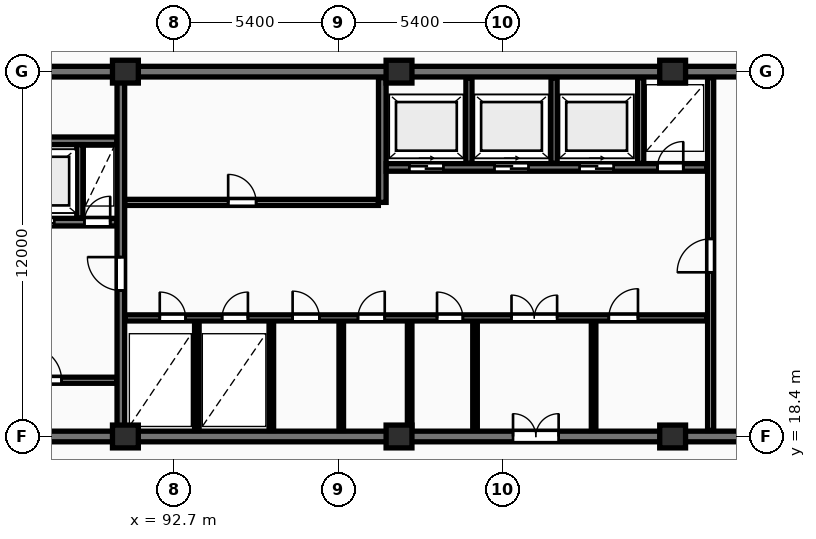
"""IFC4 building model, lengths in metres.
Left out: names, types, materials, properties, quantities, classifications, styles, units other than length and angle.
Written with IfcOpenShell. Run it as: python <this file> out.ifc"""

import sys

from ifc_helpers import new_model, si_unit, direction, frame, frame_2d, origin, origin_2d, place, context, subcontext, project, spatial, rectangle, extrude, element, fill, save


model = new_model("IFC4")
c1 = context("Model", 3, precision=1e-05, world=origin(), true_north=direction((0.0, 1.0)))
c2 = subcontext(c1, "Body", "Model", "MODEL_VIEW")
j1 = project(units=[si_unit("LENGTHUNIT", "METRE"), si_unit("PLANEANGLEUNIT", "RADIAN")], contexts=[c1])
p1 = place(None, origin())
s1 = spatial("IfcSite", under=j1, at=p1, CompositionType="ELEMENT")
p2 = place(p1, origin())
s2 = spatial("IfcBuilding", under=s1, at=p2, CompositionType="ELEMENT")
p3 = place(p2, frame((0.0, 0.0, 157.3)))
s3 = spatial("IfcBuildingStorey", under=s2, at=p3, CompositionType="ELEMENT", Elevation=157.3)
for number, where, z_axis, x_axis in (
    (1, (91.1, 18.4, 0.0), (0.0, 0.0, 1.0), (1.0, 0.0, 0.0)),
    (2, (91.1, 30.4, 0.0), (0.0, 0.0, 1.0), (1.0, 0.0, 0.0)),
    (3, (100.1, 18.4, 0.0), (0.0, 0.0, 1.0), (1.0, 0.0, 0.0)),
    (4, (100.1, 30.4, 0.0), (0.0, 0.0, 1.0), (1.0, 0.0, 0.0)),
    (5, (109.1, 18.4, 0.0), (0.0, 0.0, 1.0), (1.0, 0.0, 0.0)),
    (6, (109.1, 30.4, 0.0), (0.0, 0.0, 1.0), (1.0, 0.0, 0.0)),
):
    element("IfcColumn", number, at=place(p3, frame(where, z_axis=z_axis, x_axis=x_axis)), inside=s3, PredefinedType="COLUMN", context=c2, shape_type="SweptSolid", body=[
        extrude(rectangle(XDim=0.85, YDim=0.75, at=origin_2d()), origin(), (0.0, 0.0, 1.0), 4.8),
    ])
p4 = place(p3, frame((81.925, 30.4, 0.0), z_axis=(0.0, 0.0, 1.0), x_axis=(1.0, 0.0, 0.0)))
e7 = element("IfcWall", 7, at=p4, inside=s3, PredefinedType="SHEAR", context=c2, shape_type="SweptSolid", body=[
    extrude(rectangle(XDim=36.265, YDim=0.35, at=frame_2d((18.132, 0.0))), origin(), (0.0, 0.0, 1.0), 4.8),
])
p5 = place(p3, frame((81.925, 18.4, 0.0), z_axis=(0.0, 0.0, 1.0), x_axis=(1.0, 0.0, 0.0)))
e8 = element("IfcWall", 8, at=p5, inside=s3, PredefinedType="SHEAR", context=c2, shape_type="SweptSolid", body=[
    extrude(rectangle(XDim=36.265, YDim=0.35, at=frame_2d((18.132, 0.0))), origin(), (0.0, 0.0, 1.0), 4.8),
])
p6 = place(p5, frame((5.675, 0.0, 0.0)))
e9 = element("IfcOpeningElement", 9, at=p6, cuts=e8, PredefinedType="OPENING", context=c2, shape_type="SweptSolid", body=[
    extrude(rectangle(XDim=1.0, YDim=2.15, at=frame_2d((0.5, 1.075))), frame((0.0, 0.185, 0.0), z_axis=(0.0, -1.0, 0.0), x_axis=(1.0, 0.0, 0.0)), (0.0, 0.0, 1.0), 0.37),
])
p7 = place(p5, frame((21.925, 0.0, 0.0)))
e10 = element("IfcOpeningElement", 10, at=p7, cuts=e8, PredefinedType="OPENING", context=c2, shape_type="SweptSolid", body=[
    extrude(rectangle(XDim=1.5, YDim=2.2, at=frame_2d((0.75, 1.1))), frame((0.0, 0.185, 0.0), z_axis=(0.0, -1.0, 0.0), x_axis=(1.0, 0.0, 0.0)), (0.0, 0.0, 1.0), 0.37),
])
p8 = place(p5, frame((29.875, 0.0, 0.0)))
e11 = element("IfcOpeningElement", 11, at=p8, cuts=e8, PredefinedType="OPENING", context=c2, shape_type="SweptSolid", body=[
    extrude(rectangle(XDim=1.0, YDim=2.15, at=frame_2d((0.5, 1.075))), frame((0.0, 0.185, 0.0), z_axis=(0.0, -1.0, 0.0), x_axis=(1.0, 0.0, 0.0)), (0.0, 0.0, 1.0), 0.37),
])
p9 = place(p3, frame((83.0, 28.125, 0.0), z_axis=(0.0, 0.0, 1.0), x_axis=(1.0, 0.0, 0.0)))
e12 = element("IfcWall", 12, at=p9, inside=s3, PredefinedType="SHEAR", context=c2, shape_type="SweptSolid", body=[
    extrude(rectangle(XDim=7.82, YDim=0.25, at=frame_2d((3.91, 0.0))), origin(), (0.0, 0.0, 1.0), 4.8),
])
p10 = place(p3, frame((86.5, 25.45, 0.0), z_axis=(0.0, 0.0, 1.0), x_axis=(1.0, 0.0, 0.0)))
e13 = element("IfcWall", 13, at=p10, inside=s3, PredefinedType="SHEAR", context=c2, shape_type="SweptSolid", body=[
    extrude(rectangle(XDim=4.32, YDim=0.25, at=frame_2d((2.16, 0.0))), origin(), (0.0, 0.0, 1.0), 4.8),
])
p11 = place(p10, frame((1.14, 0.0, 0.0)))
e14 = element("IfcOpeningElement", 14, at=p11, cuts=e13, PredefinedType="OPENING", context=c2, shape_type="SweptSolid", body=[
    extrude(rectangle(XDim=1.12, YDim=2.12, at=frame_2d((0.56, 1.06))), frame((0.0, 0.135, 0.0), z_axis=(0.0, -1.0, 0.0), x_axis=(1.0, 0.0, 0.0)), (0.0, 0.0, 1.0), 0.27),
])
p12 = place(p10, frame((3.25, 0.0, 0.0)))
e15 = element("IfcOpeningElement", 15, at=p12, cuts=e13, PredefinedType="OPENING", context=c2, shape_type="SweptSolid", body=[
    extrude(rectangle(XDim=0.85, YDim=2.05, at=frame_2d((0.425, 1.025))), frame((0.0, 0.135, 0.0), z_axis=(0.0, -1.0, 0.0), x_axis=(1.0, 0.0, 0.0)), (0.0, 0.0, 1.0), 0.27),
])
p13 = place(p3, frame((89.6, 25.58, 0.0), z_axis=(0.0, 0.0, 1.0), x_axis=(0.0, 1.0, 0.0)))
e16 = element("IfcWall", 16, at=p13, inside=s3, PredefinedType="PARTITIONING", context=c2, shape_type="SweptSolid", body=[
    extrude(rectangle(XDim=2.42, YDim=0.2, at=frame_2d((1.21, 0.0))), origin(), (0.0, 0.0, 1.0), 4.48),
])
p14 = place(p3, frame((86.5, 20.25, 0.0), z_axis=(0.0, 0.0, 1.0), x_axis=(1.0, 0.0, 0.0)))
e17 = element("IfcWall", 17, at=p14, inside=s3, PredefinedType="PARTITIONING", context=c2, shape_type="SweptSolid", body=[
    extrude(rectangle(XDim=4.32, YDim=0.2, at=frame_2d((2.16, 0.0))), origin(), (0.0, 0.0, 1.0), 4.48),
])
p15 = place(p14, frame((1.4, 0.0, 0.0)))
e18 = element("IfcOpeningElement", 18, at=p15, cuts=e17, PredefinedType="OPENING", context=c2, shape_type="SweptSolid", body=[
    extrude(rectangle(XDim=1.1, YDim=2.1, at=frame_2d((0.55, 1.05))), frame((0.0, 0.11, 0.0), z_axis=(0.0, -1.0, 0.0), x_axis=(1.0, 0.0, 0.0)), (0.0, 0.0, 1.0), 0.22),
])
p16 = place(p3, frame((90.95, 18.6, 0.0), z_axis=(0.0, 0.0, 1.0), x_axis=(0.0, 1.0, 0.0)))
e19 = element("IfcWall", 19, at=p16, inside=s3, PredefinedType="SHEAR", context=c2, shape_type="SweptSolid", body=[
    extrude(rectangle(XDim=11.6, YDim=0.25, at=frame_2d((5.8, 0.0))), origin(), (0.0, 0.0, 1.0), 4.8),
])
p17 = place(p16, frame((4.6, 0.0, 0.0)))
e20 = element("IfcOpeningElement", 20, at=p17, cuts=e19, PredefinedType="OPENING", context=c2, shape_type="SweptSolid", body=[
    extrude(rectangle(XDim=1.1, YDim=2.1, at=frame_2d((0.55, 1.05))), frame((0.0, 0.135, 0.0), z_axis=(0.0, -1.0, 0.0), x_axis=(1.0, 0.0, 0.0)), (0.0, 0.0, 1.0), 0.27),
])
p18 = place(p3, frame((91.08, 26.1, 0.0), z_axis=(0.0, 0.0, 1.0), x_axis=(1.0, 0.0, 0.0)))
e21 = element("IfcWall", 21, at=p18, inside=s3, PredefinedType="PARTITIONING", context=c2, shape_type="SweptSolid", body=[
    extrude(rectangle(XDim=8.34, YDim=0.2, at=frame_2d((4.17, 0.0))), origin(), (0.0, 0.0, 1.0), 4.48),
])
p19 = place(p18, frame((3.4, 0.0, 0.0)))
e22 = element("IfcOpeningElement", 22, at=p19, cuts=e21, PredefinedType="OPENING", context=c2, shape_type="SweptSolid", body=[
    extrude(rectangle(XDim=0.92, YDim=2.08, at=frame_2d((0.46, 1.04))), frame((0.0, 0.11, 0.0), z_axis=(0.0, -1.0, 0.0), x_axis=(1.0, 0.0, 0.0)), (0.0, 0.0, 1.0), 0.22),
])
p20 = place(p3, frame((99.55, 26.1, 0.0), z_axis=(0.0, 0.0, 1.0), x_axis=(0.0, 1.0, 0.0)))
e23 = element("IfcWall", 23, at=p20, inside=s3, PredefinedType="SHEAR", context=c2, shape_type="SweptSolid", body=[
    extrude(rectangle(XDim=4.1, YDim=0.25, at=frame_2d((2.05, 0.0))), origin(), (0.0, 0.0, 1.0), 4.8),
])
for number, where, z_axis, x_axis in (
    (24, (102.4, 27.38, 0.0), (0.0, 0.0, 1.0), (0.0, 1.0, 0.0)),
    (25, (105.2, 27.38, 0.0), (0.0, 0.0, 1.0), (0.0, 1.0, 0.0)),
    (26, (108.05, 27.38, 0.0), (0.0, 0.0, 1.0), (0.0, 1.0, 0.0)),
):
    element("IfcWall", number, at=place(p3, frame(where, z_axis=z_axis, x_axis=x_axis)), inside=s3, PredefinedType="PARTITIONING", context=c2, shape_type="SweptSolid", body=[
        extrude(rectangle(XDim=2.82, YDim=0.2, at=frame_2d((1.41, 0.0))), origin(), (0.0, 0.0, 1.0), 4.48),
    ])
p21 = place(p3, frame((99.68, 27.25, 0.0), z_axis=(0.0, 0.0, 1.0), x_axis=(1.0, 0.0, 0.0)))
e27 = element("IfcWall", 27, at=p21, inside=s3, PredefinedType="SHEAR", context=c2, shape_type="SweptSolid", body=[
    extrude(rectangle(XDim=10.54, YDim=0.25, at=frame_2d((5.27, 0.0))), origin(), (0.0, 0.0, 1.0), 4.8),
])
p22 = place(p21, frame((0.76, 0.0, 0.0)))
e28 = element("IfcOpeningElement", 28, at=p22, cuts=e27, PredefinedType="OPENING", context=c2, shape_type="SweptSolid", body=[
    extrude(rectangle(XDim=1.12, YDim=2.12, at=frame_2d((0.56, 1.06))), frame((0.0, 0.135, 0.0), z_axis=(0.0, -1.0, 0.0), x_axis=(1.0, 0.0, 0.0)), (0.0, 0.0, 1.0), 0.27),
])
p23 = place(p21, frame((3.56, 0.0, 0.0)))
e29 = element("IfcOpeningElement", 29, at=p23, cuts=e27, PredefinedType="OPENING", context=c2, shape_type="SweptSolid", body=[
    extrude(rectangle(XDim=1.12, YDim=2.12, at=frame_2d((0.56, 1.06))), frame((0.0, 0.135, 0.0), z_axis=(0.0, -1.0, 0.0), x_axis=(1.0, 0.0, 0.0)), (0.0, 0.0, 1.0), 0.27),
])
p24 = place(p21, frame((6.36, 0.0, 0.0)))
e30 = element("IfcOpeningElement", 30, at=p24, cuts=e27, PredefinedType="OPENING", context=c2, shape_type="SweptSolid", body=[
    extrude(rectangle(XDim=1.12, YDim=2.12, at=frame_2d((0.56, 1.06))), frame((0.0, 0.135, 0.0), z_axis=(0.0, -1.0, 0.0), x_axis=(1.0, 0.0, 0.0)), (0.0, 0.0, 1.0), 0.27),
])
p25 = place(p21, frame((8.92, 0.0, 0.0)))
e31 = element("IfcOpeningElement", 31, at=p25, cuts=e27, PredefinedType="OPENING", context=c2, shape_type="SweptSolid", body=[
    extrude(rectangle(XDim=0.85, YDim=2.05, at=frame_2d((0.425, 1.025))), frame((0.0, 0.135, 0.0), z_axis=(0.0, -1.0, 0.0), x_axis=(1.0, 0.0, 0.0)), (0.0, 0.0, 1.0), 0.27),
])
for number, where, z_axis, x_axis in (
    (32, (93.45, 18.6, 0.0), (0.0, 0.0, 1.0), (0.0, 1.0, 0.0)),
    (33, (95.9, 18.6, 0.0), (0.0, 0.0, 1.0), (0.0, 1.0, 0.0)),
    (34, (98.2, 18.6, 0.0), (0.0, 0.0, 1.0), (0.0, 1.0, 0.0)),
):
    element("IfcWall", number, at=place(p3, frame(where, z_axis=z_axis, x_axis=x_axis)), inside=s3, PredefinedType="PARTITIONING", context=c2, shape_type="SweptSolid", body=[
        extrude(rectangle(XDim=3.6, YDim=0.15, at=frame_2d((1.8, 0.0))), origin(), (0.0, 0.0, 1.0), 4.48),
    ])
p26 = place(p3, frame((100.45, 18.6, 0.0), z_axis=(0.0, 0.0, 1.0), x_axis=(0.0, 1.0, 0.0)))
e35 = element("IfcWall", 35, at=p26, inside=s3, PredefinedType="PARTITIONING", context=c2, shape_type="SweptSolid", body=[
    extrude(rectangle(XDim=3.6, YDim=0.15, at=frame_2d((1.8, 0.0))), origin(), (0.0, 0.0, 1.0), 3.33),
])
for number, where, z_axis, x_axis in (
    (36, (102.6, 18.6, 0.0), (0.0, 0.0, 1.0), (0.0, 1.0, 0.0)),
    (37, (106.5, 18.6, 0.0), (0.0, 0.0, 1.0), (0.0, 1.0, 0.0)),
):
    element("IfcWall", number, at=place(p3, frame(where, z_axis=z_axis, x_axis=x_axis)), inside=s3, PredefinedType="PARTITIONING", context=c2, shape_type="SweptSolid", body=[
        extrude(rectangle(XDim=3.6, YDim=0.15, at=frame_2d((1.8, 0.0))), origin(), (0.0, 0.0, 1.0), 4.48),
    ])
p27 = place(p3, frame((91.08, 22.3, 0.0), z_axis=(0.0, 0.0, 1.0), x_axis=(1.0, 0.0, 0.0)))
e38 = element("IfcWall", 38, at=p27, inside=s3, PredefinedType="PARTITIONING", context=c2, shape_type="SweptSolid", body=[
    extrude(rectangle(XDim=19.14, YDim=0.2, at=frame_2d((9.57, 0.0))), origin(), (0.0, 0.0, 1.0), 4.48),
])
p28 = place(p27, frame((1.15, 0.0, 0.0)))
e39 = element("IfcOpeningElement", 39, at=p28, cuts=e38, PredefinedType="OPENING", context=c2, shape_type="SweptSolid", body=[
    extrude(rectangle(XDim=0.85, YDim=2.05, at=frame_2d((0.425, 1.025))), frame((0.0, 0.11, 0.0), z_axis=(0.0, -1.0, 0.0), x_axis=(1.0, 0.0, 0.0)), (0.0, 0.0, 1.0), 0.22),
])
p29 = place(p27, frame((3.2, 0.0, 0.0)))
e40 = element("IfcOpeningElement", 40, at=p29, cuts=e38, PredefinedType="OPENING", context=c2, shape_type="SweptSolid", body=[
    extrude(rectangle(XDim=0.85, YDim=2.05, at=frame_2d((0.425, 1.025))), frame((0.0, 0.11, 0.0), z_axis=(0.0, -1.0, 0.0), x_axis=(1.0, 0.0, 0.0)), (0.0, 0.0, 1.0), 0.22),
])
p30 = place(p27, frame((12.72, 0.0, 0.0)))
e41 = element("IfcOpeningElement", 41, at=p30, cuts=e38, PredefinedType="OPENING", context=c2, shape_type="SweptSolid", body=[
    extrude(rectangle(XDim=1.5, YDim=2.2, at=frame_2d((0.75, 1.1))), frame((0.0, 0.11, 0.0), z_axis=(0.0, -1.0, 0.0), x_axis=(1.0, 0.0, 0.0)), (0.0, 0.0, 1.0), 0.22),
])
p31 = place(p27, frame((5.52, 0.0, 0.0)))
e42 = element("IfcOpeningElement", 42, at=p31, cuts=e38, PredefinedType="OPENING", context=c2, shape_type="SweptSolid", body=[
    extrude(rectangle(XDim=0.88, YDim=2.06, at=frame_2d((0.44, 1.03))), frame((0.0, 0.11, 0.0), z_axis=(0.0, -1.0, 0.0), x_axis=(1.0, 0.0, 0.0)), (0.0, 0.0, 1.0), 0.22),
])
p32 = place(p27, frame((7.67, 0.0, 0.0)))
e43 = element("IfcOpeningElement", 43, at=p32, cuts=e38, PredefinedType="OPENING", context=c2, shape_type="SweptSolid", body=[
    extrude(rectangle(XDim=0.88, YDim=2.06, at=frame_2d((0.44, 1.03))), frame((0.0, 0.11, 0.0), z_axis=(0.0, -1.0, 0.0), x_axis=(1.0, 0.0, 0.0)), (0.0, 0.0, 1.0), 0.22),
])
p33 = place(p27, frame((10.27, 0.0, 0.0)))
e44 = element("IfcOpeningElement", 44, at=p33, cuts=e38, PredefinedType="OPENING", context=c2, shape_type="SweptSolid", body=[
    extrude(rectangle(XDim=0.85, YDim=2.05, at=frame_2d((0.425, 1.025))), frame((0.0, 0.11, 0.0), z_axis=(0.0, -1.0, 0.0), x_axis=(1.0, 0.0, 0.0)), (0.0, 0.0, 1.0), 0.22),
])
p34 = place(p27, frame((15.92, 0.0, 0.0)))
e45 = element("IfcOpeningElement", 45, at=p34, cuts=e38, PredefinedType="OPENING", context=c2, shape_type="SweptSolid", body=[
    extrude(rectangle(XDim=0.96, YDim=2.1, at=frame_2d((0.48, 1.05))), frame((0.0, 0.11, 0.0), z_axis=(0.0, -1.0, 0.0), x_axis=(1.0, 0.0, 0.0)), (0.0, 0.0, 1.0), 0.22),
])
p35 = place(p3, frame((110.35, 18.6, 0.0), z_axis=(0.0, 0.0, 1.0), x_axis=(0.0, 1.0, 0.0)))
e46 = element("IfcWall", 46, at=p35, inside=s3, PredefinedType="PARTITIONING", context=c2, shape_type="SweptSolid", body=[
    extrude(rectangle(XDim=11.6, YDim=0.2, at=frame_2d((5.8, 0.0))), origin(), (0.0, 0.0, 1.0), 4.48),
])
p36 = place(p35, frame((5.2, 0.0, 0.0)))
e47 = element("IfcOpeningElement", 47, at=p36, cuts=e46, PredefinedType="OPENING", context=c2, shape_type="SweptSolid", body=[
    extrude(rectangle(XDim=1.1, YDim=2.15, at=frame_2d((0.55, 1.075))), frame((0.0, 0.11, 0.0), z_axis=(0.0, -1.0, 0.0), x_axis=(1.0, 0.0, 0.0)), (0.0, 0.0, 1.0), 0.22),
])
p37 = place(p7, origin())
e48 = element("IfcDoor", 48, at=p37, inside=s3, OperationType="DOUBLE_DOOR_SINGLE_SWING", PredefinedType="DOOR", context=c2, shape_type="SweptSolid", body=[
    extrude(rectangle(XDim=1.5, YDim=2.2, at=frame_2d((0.75, 1.1))), frame((0.0, 0.025, 0.0), z_axis=(0.0, -1.0, 0.0), x_axis=(1.0, 0.0, 0.0)), (0.0, 0.0, 1.0), 0.05),
])
fill(e10, e48)
p38 = place(p11, origin())
e49 = element("IfcDoor", 49, at=p38, inside=s3, OperationType="SLIDING_TO_RIGHT", PredefinedType="DOOR", context=c2, shape_type="SweptSolid", body=[
    extrude(rectangle(XDim=1.12, YDim=2.12, at=frame_2d((0.56, 1.06))), frame((0.0, 0.025, 0.0), z_axis=(0.0, -1.0, 0.0), x_axis=(1.0, 0.0, 0.0)), (0.0, 0.0, 1.0), 0.05),
])
fill(e14, e49)
p39 = place(p12, origin())
e50 = element("IfcDoor", 50, at=p39, inside=s3, OperationType="SINGLE_SWING_RIGHT", PredefinedType="DOOR", context=c2, shape_type="SweptSolid", body=[
    extrude(rectangle(XDim=0.85, YDim=2.05, at=frame_2d((0.425, 1.025))), frame((0.0, 0.025, 0.0), z_axis=(0.0, -1.0, 0.0), x_axis=(1.0, 0.0, 0.0)), (0.0, 0.0, 1.0), 0.05),
])
fill(e15, e50)
p40 = place(p15, origin())
e51 = element("IfcDoor", 51, at=p40, inside=s3, OperationType="SINGLE_SWING_LEFT", PredefinedType="DOOR", context=c2, shape_type="SweptSolid", body=[
    extrude(rectangle(XDim=1.1, YDim=2.1, at=frame_2d((0.55, 1.05))), frame((0.0, 0.025, 0.0), z_axis=(0.0, -1.0, 0.0), x_axis=(1.0, 0.0, 0.0)), (0.0, 0.0, 1.0), 0.05),
])
fill(e18, e51)
p41 = place(p17, origin())
e52 = element("IfcDoor", 52, at=p41, inside=s3, OperationType="SINGLE_SWING_RIGHT", PredefinedType="DOOR", context=c2, shape_type="SweptSolid", body=[
    extrude(rectangle(XDim=1.1, YDim=2.1, at=frame_2d((0.55, 1.05))), frame((0.0, 0.025, 0.0), z_axis=(0.0, -1.0, 0.0), x_axis=(1.0, 0.0, 0.0)), (0.0, 0.0, 1.0), 0.05),
])
fill(e20, e52)
p42 = place(p19, origin())
e53 = element("IfcDoor", 53, at=p42, inside=s3, OperationType="SINGLE_SWING_LEFT", PredefinedType="DOOR", context=c2, shape_type="SweptSolid", body=[
    extrude(rectangle(XDim=0.92, YDim=2.08, at=frame_2d((0.46, 1.04))), frame((0.0, 0.025, 0.0), z_axis=(0.0, -1.0, 0.0), x_axis=(1.0, 0.0, 0.0)), (0.0, 0.0, 1.0), 0.05),
])
fill(e22, e53)
p43 = place(p22, origin())
e54 = element("IfcDoor", 54, at=p43, inside=s3, OperationType="SLIDING_TO_RIGHT", PredefinedType="DOOR", context=c2, shape_type="SweptSolid", body=[
    extrude(rectangle(XDim=1.12, YDim=2.12, at=frame_2d((0.56, 1.06))), frame((0.0, 0.025, 0.0), z_axis=(0.0, -1.0, 0.0), x_axis=(1.0, 0.0, 0.0)), (0.0, 0.0, 1.0), 0.05),
])
fill(e28, e54)
p44 = place(p23, origin())
e55 = element("IfcDoor", 55, at=p44, inside=s3, OperationType="SLIDING_TO_RIGHT", PredefinedType="DOOR", context=c2, shape_type="SweptSolid", body=[
    extrude(rectangle(XDim=1.12, YDim=2.12, at=frame_2d((0.56, 1.06))), frame((0.0, 0.025, 0.0), z_axis=(0.0, -1.0, 0.0), x_axis=(1.0, 0.0, 0.0)), (0.0, 0.0, 1.0), 0.05),
])
fill(e29, e55)
p45 = place(p24, origin())
e56 = element("IfcDoor", 56, at=p45, inside=s3, OperationType="SLIDING_TO_RIGHT", PredefinedType="DOOR", context=c2, shape_type="SweptSolid", body=[
    extrude(rectangle(XDim=1.12, YDim=2.12, at=frame_2d((0.56, 1.06))), frame((0.0, 0.025, 0.0), z_axis=(0.0, -1.0, 0.0), x_axis=(1.0, 0.0, 0.0)), (0.0, 0.0, 1.0), 0.05),
])
fill(e30, e56)
p46 = place(p25, origin())
e57 = element("IfcDoor", 57, at=p46, inside=s3, OperationType="SINGLE_SWING_RIGHT", PredefinedType="DOOR", context=c2, shape_type="SweptSolid", body=[
    extrude(rectangle(XDim=0.85, YDim=2.05, at=frame_2d((0.425, 1.025))), frame((0.0, 0.025, 0.0), z_axis=(0.0, -1.0, 0.0), x_axis=(1.0, 0.0, 0.0)), (0.0, 0.0, 1.0), 0.05),
])
fill(e31, e57)
p47 = place(p28, origin())
e58 = element("IfcDoor", 58, at=p47, inside=s3, OperationType="SINGLE_SWING_LEFT", PredefinedType="DOOR", context=c2, shape_type="SweptSolid", body=[
    extrude(rectangle(XDim=0.85, YDim=2.05, at=frame_2d((0.425, 1.025))), frame((0.0, 0.025, 0.0), z_axis=(0.0, -1.0, 0.0), x_axis=(1.0, 0.0, 0.0)), (0.0, 0.0, 1.0), 0.05),
])
fill(e39, e58)
p48 = place(p29, origin())
e59 = element("IfcDoor", 59, at=p48, inside=s3, OperationType="SINGLE_SWING_RIGHT", PredefinedType="DOOR", context=c2, shape_type="SweptSolid", body=[
    extrude(rectangle(XDim=0.85, YDim=2.05, at=frame_2d((0.425, 1.025))), frame((0.0, 0.025, 0.0), z_axis=(0.0, -1.0, 0.0), x_axis=(1.0, 0.0, 0.0)), (0.0, 0.0, 1.0), 0.05),
])
fill(e40, e59)
p49 = place(p30, origin())
e60 = element("IfcDoor", 60, at=p49, inside=s3, OperationType="DOUBLE_DOOR_SINGLE_SWING", PredefinedType="DOOR", context=c2, shape_type="SweptSolid", body=[
    extrude(rectangle(XDim=1.5, YDim=2.2, at=frame_2d((0.75, 1.1))), frame((0.0, 0.025, 0.0), z_axis=(0.0, -1.0, 0.0), x_axis=(1.0, 0.0, 0.0)), (0.0, 0.0, 1.0), 0.05),
])
fill(e41, e60)
p50 = place(p31, origin())
e61 = element("IfcDoor", 61, at=p50, inside=s3, OperationType="SINGLE_SWING_LEFT", PredefinedType="DOOR", context=c2, shape_type="SweptSolid", body=[
    extrude(rectangle(XDim=0.88, YDim=2.06, at=frame_2d((0.44, 1.03))), frame((0.0, 0.025, 0.0), z_axis=(0.0, -1.0, 0.0), x_axis=(1.0, 0.0, 0.0)), (0.0, 0.0, 1.0), 0.05),
])
fill(e42, e61)
p51 = place(p32, origin())
e62 = element("IfcDoor", 62, at=p51, inside=s3, OperationType="SINGLE_SWING_RIGHT", PredefinedType="DOOR", context=c2, shape_type="SweptSolid", body=[
    extrude(rectangle(XDim=0.88, YDim=2.06, at=frame_2d((0.44, 1.03))), frame((0.0, 0.025, 0.0), z_axis=(0.0, -1.0, 0.0), x_axis=(1.0, 0.0, 0.0)), (0.0, 0.0, 1.0), 0.05),
])
fill(e43, e62)
p52 = place(p33, origin())
e63 = element("IfcDoor", 63, at=p52, inside=s3, OperationType="SINGLE_SWING_LEFT", PredefinedType="DOOR", context=c2, shape_type="SweptSolid", body=[
    extrude(rectangle(XDim=0.85, YDim=2.05, at=frame_2d((0.425, 1.025))), frame((0.0, 0.025, 0.0), z_axis=(0.0, -1.0, 0.0), x_axis=(1.0, 0.0, 0.0)), (0.0, 0.0, 1.0), 0.05),
])
fill(e44, e63)
p53 = place(p34, origin())
e64 = element("IfcDoor", 64, at=p53, inside=s3, OperationType="SINGLE_SWING_RIGHT", PredefinedType="DOOR", context=c2, shape_type="SweptSolid", body=[
    extrude(rectangle(XDim=0.96, YDim=2.1, at=frame_2d((0.48, 1.05))), frame((0.0, 0.025, 0.0), z_axis=(0.0, -1.0, 0.0), x_axis=(1.0, 0.0, 0.0)), (0.0, 0.0, 1.0), 0.05),
])
fill(e45, e64)
p54 = place(p36, origin())
e65 = element("IfcDoor", 65, at=p54, inside=s3, OperationType="SINGLE_SWING_LEFT", PredefinedType="DOOR", context=c2, shape_type="SweptSolid", body=[
    extrude(rectangle(XDim=1.1, YDim=2.15, at=frame_2d((0.55, 1.075))), frame((0.0, 0.025, 0.0), z_axis=(0.0, -1.0, 0.0), x_axis=(1.0, 0.0, 0.0)), (0.0, 0.0, 1.0), 0.05),
])
fill(e47, e65)
save(model, sys.argv[1])
